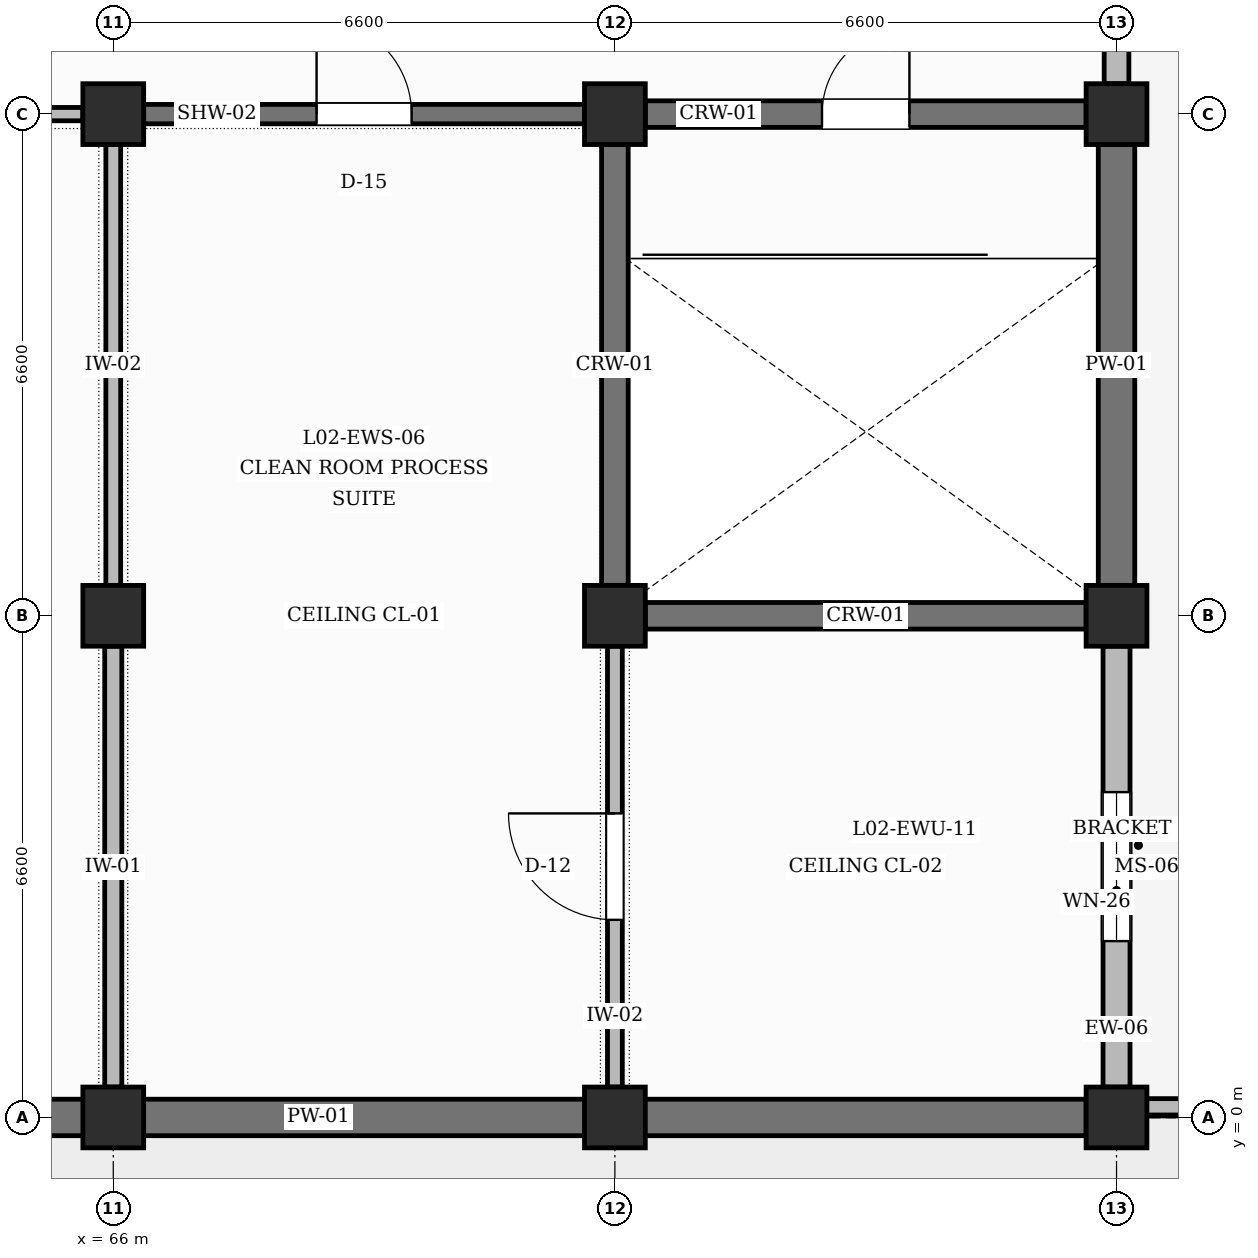
"""IFC4 building model, lengths in metres.
Left out: names, types, materials, properties, quantities, classifications, styles, units other than length and angle.
Written with IfcOpenShell. Run it as: python <this file> out.ifc"""

import sys

from ifc_helpers import new_model, si_unit, direction, frame, frame_2d, origin, origin_2d, place, context, subcontext, project, spatial, rectangle, extrude, element, fill, save


model = new_model("IFC4")
c1 = context("Model", 3, precision=1e-05, world=origin(), true_north=direction((0.0, 1.0)))
c2 = subcontext(c1, "Body", "Model", "MODEL_VIEW")
j1 = project(units=[si_unit("LENGTHUNIT", "METRE"), si_unit("PLANEANGLEUNIT", "RADIAN")], contexts=[c1])
p1 = place(None, origin())
s1 = spatial("IfcSite", under=j1, at=p1, CompositionType="ELEMENT")
p2 = place(p1, origin())
s2 = spatial("IfcBuilding", under=s1, at=p2, CompositionType="ELEMENT")
p3 = place(p2, frame((0.0, 0.0, 10.2)))
s3 = spatial("IfcBuildingStorey", under=s2, at=p3, CompositionType="ELEMENT", Elevation=10.2)
for number, where, z_axis, x_axis in (
    (1, (66.0, 0.0, 0.0), (0.0, 0.0, 1.0), (1.0, 0.0, 0.0)),
    (2, (66.0, 6.6, 0.0), (0.0, 0.0, 1.0), (1.0, 0.0, 0.0)),
    (3, (66.0, 13.2, 0.0), (0.0, 0.0, 1.0), (1.0, 0.0, 0.0)),
    (4, (72.6, 0.0, 0.0), (0.0, 0.0, 1.0), (1.0, 0.0, 0.0)),
    (5, (72.6, 6.6, 0.0), (0.0, 0.0, 1.0), (1.0, 0.0, 0.0)),
    (6, (72.6, 13.2, 0.0), (0.0, 0.0, 1.0), (1.0, 0.0, 0.0)),
    (7, (79.2, 0.0, 0.0), (0.0, 0.0, 1.0), (1.0, 0.0, 0.0)),
    (8, (79.2, 6.6, 0.0), (0.0, 0.0, 1.0), (1.0, 0.0, 0.0)),
    (9, (79.2, 13.2, 0.0), (0.0, 0.0, 1.0), (1.0, 0.0, 0.0)),
):
    element("IfcColumn", number, at=place(p3, frame(where, z_axis=z_axis, x_axis=x_axis)), inside=s3, PredefinedType="COLUMN", context=c2, shape_type="SweptSolid", body=[
        extrude(rectangle(XDim=0.8, YDim=0.8, at=origin_2d()), origin(), (0.0, 0.0, 1.0), 4.2),
    ])
for number, where, z_axis, x_axis in (
    (10, (59.8, 0.0, 0.0), (0.0, 0.0, 1.0), (1.0, 0.0, 0.0)),
    (11, (66.4, 0.0, 0.0), (0.0, 0.0, 1.0), (1.0, 0.0, 0.0)),
    (12, (73.0, 0.0, 0.0), (0.0, 0.0, 1.0), (1.0, 0.0, 0.0)),
):
    element("IfcWall", number, at=place(p3, frame(where, z_axis=z_axis, x_axis=x_axis)), inside=s3, PredefinedType="SOLIDWALL", context=c2, shape_type="SweptSolid", body=[
        extrude(rectangle(XDim=5.8, YDim=0.48, at=frame_2d((2.9, 0.0))), origin(), (0.0, 0.0, 1.0), 3.25),
    ])
p4 = place(p3, frame((79.2, 0.4, 0.0), z_axis=(0.0, 0.0, 1.0), x_axis=(0.0, 1.0, 0.0)))
e13 = element("IfcWall", 13, at=p4, inside=s3, PredefinedType="SOLIDWALL", context=c2, shape_type="SweptSolid", body=[
    extrude(rectangle(XDim=5.8, YDim=0.355, at=frame_2d((2.9, 0.0))), origin(), (0.0, 0.0, 1.0), 3.25),
])
p5 = place(p4, frame((1.92, 0.0, 0.95)))
e14 = element("IfcOpeningElement", 14, at=p5, cuts=e13, PredefinedType="OPENING", context=c2, shape_type="SweptSolid", body=[
    extrude(rectangle(XDim=1.96, YDim=1.52, at=frame_2d((0.98, 0.76))), frame((0.0, 0.188, 0.0), z_axis=(0.0, -1.0, 0.0), x_axis=(1.0, 0.0, 0.0)), (0.0, 0.0, 1.0), 0.375),
])
p6 = place(p3, frame((79.2, 7.0, 0.0), z_axis=(0.0, 0.0, 1.0), x_axis=(0.0, 1.0, 0.0)))
e15 = element("IfcWall", 15, at=p6, inside=s3, PredefinedType="SOLIDWALL", context=c2, shape_type="SweptSolid", body=[
    extrude(rectangle(XDim=5.8, YDim=0.48, at=frame_2d((2.9, 0.0))), origin(), (0.0, 0.0, 1.0), 3.25),
])
p7 = place(p3, frame((79.2, 13.6, 0.0), z_axis=(0.0, 0.0, 1.0), x_axis=(0.0, 1.0, 0.0)))
e16 = element("IfcWall", 16, at=p7, inside=s3, PredefinedType="SOLIDWALL", context=c2, shape_type="SweptSolid", body=[
    extrude(rectangle(XDim=5.8, YDim=0.325, at=frame_2d((2.9, 0.0))), origin(), (0.0, 0.0, 1.0), 3.25),
])
p8 = place(p7, frame((1.92, 0.0, 0.95)))
e17 = element("IfcOpeningElement", 17, at=p8, cuts=e16, PredefinedType="OPENING", context=c2, shape_type="SweptSolid", body=[
    extrude(rectangle(XDim=1.96, YDim=1.74, at=frame_2d((0.98, 0.87))), frame((0.0, 0.172, 0.0), z_axis=(0.0, -1.0, 0.0), x_axis=(1.0, 0.0, 0.0)), (0.0, 0.0, 1.0), 0.345),
])
p9 = place(p3, frame((79.34, 0.14, 0.0), z_axis=(0.0, 0.0, 1.0), x_axis=(1.0, 0.0, 0.0)))
e18 = element("IfcWall", 18, at=p9, inside=s3, PredefinedType="PARAPET", context=c2, shape_type="SweptSolid", body=[
    extrude(rectangle(XDim=6.32, YDim=0.215, at=frame_2d((3.16, 0.0))), origin(), (0.0, 0.0, 1.0), 1.15),
])
p10 = place(p3, frame((73.0, 6.6, 0.0), z_axis=(0.0, 0.0, 1.0), x_axis=(1.0, 0.0, 0.0)))
e19 = element("IfcWall", 19, at=p10, inside=s3, PredefinedType="SHEAR", context=c2, shape_type="SweptSolid", body=[
    extrude(rectangle(XDim=5.8, YDim=0.35, at=frame_2d((2.9, 0.0))), origin(), (0.0, 0.0, 1.0), 3.0),
])
p11 = place(p3, frame((73.0, 13.2, 0.0), z_axis=(0.0, 0.0, 1.0), x_axis=(1.0, 0.0, 0.0)))
e20 = element("IfcWall", 20, at=p11, inside=s3, PredefinedType="SHEAR", context=c2, shape_type="SweptSolid", body=[
    extrude(rectangle(XDim=5.8, YDim=0.35, at=frame_2d((2.9, 0.0))), origin(), (0.0, 0.0, 1.0), 3.1),
])
p12 = place(p11, frame((2.325, 0.0, 0.0)))
e21 = element("IfcOpeningElement", 21, at=p12, cuts=e20, PredefinedType="OPENING", context=c2, shape_type="SweptSolid", body=[
    extrude(rectangle(XDim=1.15, YDim=2.2, at=frame_2d((0.575, 1.1))), frame((0.0, 0.185, 0.0), z_axis=(0.0, -1.0, 0.0), x_axis=(1.0, 0.0, 0.0)), (0.0, 0.0, 1.0), 0.37),
])
p13 = place(p3, frame((72.6, 7.0, 0.0), z_axis=(0.0, 0.0, 1.0), x_axis=(0.0, 1.0, 0.0)))
e22 = element("IfcWall", 22, at=p13, inside=s3, PredefinedType="SHEAR", context=c2, shape_type="SweptSolid", body=[
    extrude(rectangle(XDim=5.8, YDim=0.35, at=frame_2d((2.9, 0.0))), origin(), (0.0, 0.0, 1.0), 3.1),
])
p14 = place(p3, frame((66.0, 0.4, 0.0), z_axis=(0.0, 0.0, 1.0), x_axis=(0.0, 1.0, 0.0)))
e23 = element("IfcWall", 23, at=p14, inside=s3, PredefinedType="PARTITIONING", context=c2, shape_type="SweptSolid", body=[
    extrude(rectangle(XDim=5.8, YDim=0.225, at=frame_2d((2.9, 0.0))), origin(), (0.0, 0.0, 1.0), 3.1),
])
p15 = place(p3, frame((66.0, 7.0, 0.0), z_axis=(0.0, 0.0, 1.0), x_axis=(0.0, 1.0, 0.0)))
e24 = element("IfcWall", 24, at=p15, inside=s3, PredefinedType="PARTITIONING", context=c2, shape_type="SweptSolid", body=[
    extrude(rectangle(XDim=5.8, YDim=0.195, at=frame_2d((2.9, 0.0))), origin(), (0.0, 0.0, 1.0), 3.1),
])
p16 = place(p3, frame((59.8, 13.2, 0.0), z_axis=(0.0, 0.0, 1.0), x_axis=(1.0, 0.0, 0.0)))
e25 = element("IfcWall", 25, at=p16, inside=s3, PredefinedType="PARTITIONING", context=c2, shape_type="SweptSolid", body=[
    extrude(rectangle(XDim=5.8, YDim=0.175, at=frame_2d((2.9, 0.0))), origin(), (0.0, 0.0, 1.0), 3.1),
])
p17 = place(p16, frame((2.25, 0.0, 0.0)))
e26 = element("IfcOpeningElement", 26, at=p17, cuts=e25, PredefinedType="OPENING", context=c2, shape_type="SweptSolid", body=[
    extrude(rectangle(XDim=1.3, YDim=2.3, at=frame_2d((0.65, 1.15))), frame((0.0, 0.097, 0.0), z_axis=(0.0, -1.0, 0.0), x_axis=(1.0, 0.0, 0.0)), (0.0, 0.0, 1.0), 0.195),
])
p18 = place(p3, frame((72.6, 0.4, 0.0), z_axis=(0.0, 0.0, 1.0), x_axis=(0.0, 1.0, 0.0)))
e27 = element("IfcWall", 27, at=p18, inside=s3, PredefinedType="PARTITIONING", context=c2, shape_type="SweptSolid", body=[
    extrude(rectangle(XDim=5.8, YDim=0.195, at=frame_2d((2.9, 0.0))), origin(), (0.0, 0.0, 1.0), 3.1),
])
p19 = place(p18, frame((2.2, 0.0, 0.0)))
e28 = element("IfcOpeningElement", 28, at=p19, cuts=e27, PredefinedType="OPENING", context=c2, shape_type="SweptSolid", body=[
    extrude(rectangle(XDim=1.4, YDim=2.25, at=frame_2d((0.7, 1.125))), frame((0.0, 0.107, 0.0), z_axis=(0.0, -1.0, 0.0), x_axis=(1.0, 0.0, 0.0)), (0.0, 0.0, 1.0), 0.215),
])
p20 = place(p3, frame((66.4, 13.2, 0.0), z_axis=(0.0, 0.0, 1.0), x_axis=(1.0, 0.0, 0.0)))
e29 = element("IfcWall", 29, at=p20, inside=s3, PredefinedType="SHEAR", context=c2, shape_type="SweptSolid", body=[
    extrude(rectangle(XDim=5.8, YDim=0.255, at=frame_2d((2.9, 0.0))), origin(), (0.0, 0.0, 1.0), 3.0),
])
p21 = place(p20, frame((2.275, 0.0, 0.0)))
e30 = element("IfcOpeningElement", 30, at=p21, cuts=e29, PredefinedType="OPENING", context=c2, shape_type="SweptSolid", body=[
    extrude(rectangle(XDim=1.25, YDim=2.25, at=frame_2d((0.625, 1.125))), frame((0.0, 0.137, 0.0), z_axis=(0.0, -1.0, 0.0), x_axis=(1.0, 0.0, 0.0)), (0.0, 0.0, 1.0), 0.275),
])
p22 = place(p5, origin())
e31 = element("IfcWindow", 31, at=p22, inside=s3, PartitioningType="DOUBLE_PANEL_VERTICAL", PredefinedType="WINDOW", context=c2, shape_type="SweptSolid", body=[
    extrude(rectangle(XDim=1.96, YDim=1.52, at=frame_2d((0.98, 0.76))), frame((0.0, 0.03, 0.0), z_axis=(0.0, -1.0, 0.0), x_axis=(1.0, 0.0, 0.0)), (0.0, 0.0, 1.0), 0.06),
])
fill(e14, e31)
p23 = place(p12, origin())
e32 = element("IfcDoor", 32, at=p23, inside=s3, OperationType="SINGLE_SWING_RIGHT", PredefinedType="DOOR", context=c2, shape_type="SweptSolid", body=[
    extrude(rectangle(XDim=1.15, YDim=2.2, at=frame_2d((0.575, 1.1))), frame((0.0, 0.025, 0.0), z_axis=(0.0, -1.0, 0.0), x_axis=(1.0, 0.0, 0.0)), (0.0, 0.0, 1.0), 0.05),
])
fill(e21, e32)
p24 = place(p21, origin())
e33 = element("IfcDoor", 33, at=p24, inside=s3, OperationType="SINGLE_SWING_LEFT", PredefinedType="DOOR", context=c2, shape_type="SweptSolid", body=[
    extrude(rectangle(XDim=1.25, YDim=2.25, at=frame_2d((0.625, 1.125))), frame((0.0, 0.025, 0.0), z_axis=(0.0, -1.0, 0.0), x_axis=(1.0, 0.0, 0.0)), (0.0, 0.0, 1.0), 0.05),
])
fill(e30, e33)
p25 = place(p19, origin())
e34 = element("IfcDoor", 34, at=p25, inside=s3, OperationType="SINGLE_SWING_RIGHT", PredefinedType="DOOR", context=c2, shape_type="SweptSolid", body=[
    extrude(rectangle(XDim=1.4, YDim=2.25, at=frame_2d((0.7, 1.125))), frame((0.0, 0.025, 0.0), z_axis=(0.0, -1.0, 0.0), x_axis=(1.0, 0.0, 0.0)), (0.0, 0.0, 1.0), 0.05),
])
fill(e28, e34)
save(model, sys.argv[1])
